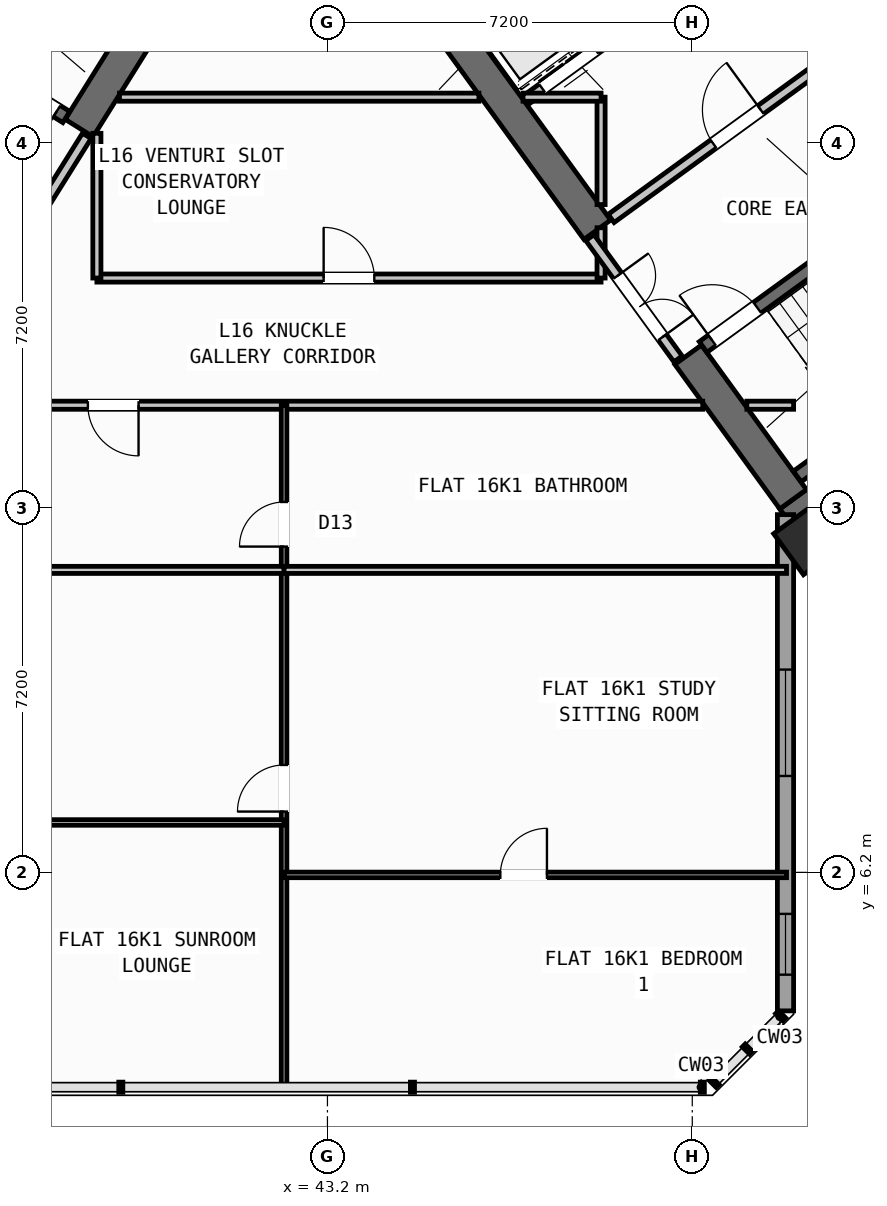
"""IFC4 building model, lengths in metres.
Left out: names, types, materials, properties, quantities, classifications, styles, units other than length and angle.
Written with IfcOpenShell. Run it as: python <this file> out.ifc"""

import sys

from ifc_helpers import new_model, si_unit, direction, frame, frame_2d, origin, origin_2d, place, context, subcontext, project, spatial, rectangle, hollow_rectangle, extrude, source, transform, mapped, element, fill, save


model = new_model("IFC4")
c1 = context("Model", 3, precision=1e-05, world=origin(), true_north=direction((0.0, 1.0)))
c2 = subcontext(c1, "Body", "Model", "MODEL_VIEW")
j1 = project(units=[si_unit("LENGTHUNIT", "METRE"), si_unit("PLANEANGLEUNIT", "RADIAN")], contexts=[c1])
p1 = place(None, origin())
s1 = spatial("IfcSite", under=j1, at=p1, CompositionType="ELEMENT")
p2 = place(p1, origin())
s2 = spatial("IfcBuilding", under=s1, at=p2, CompositionType="ELEMENT")
p3 = place(p2, frame((0.0, 0.0, 63.6)))
s3 = spatial("IfcBuildingStorey", under=s2, at=p3, CompositionType="ELEMENT", Elevation=63.6)
p4 = place(p3, frame((40.168, 23.88, 0.0), z_axis=(0.0, 0.0, 1.0), x_axis=(-0.529893103397, -0.8480644427, 0.0)))
e1 = element("IfcWall", 1, at=p4, inside=s3, PredefinedType="SHEAR", context=c2, shape_type="SweptSolid", body=[
    extrude(rectangle(XDim=3.525, YDim=0.65, at=frame_2d((1.763, 0.0))), origin(), (0.0, 0.0, 1.0), 3.35),
])
p5 = place(p3, frame((52.318, 13.11, 0.0), z_axis=(0.0, 0.0, 1.0), x_axis=(0.809019445368, 0.587781878776, 0.0)))
e2 = element("IfcWall", 2, at=p5, inside=s3, PredefinedType="SHEAR", context=c2, shape_type="SweptSolid", body=[
    extrude(rectangle(XDim=12.44, YDim=0.65, at=frame_2d((6.22, 0.0))), origin(), (0.0, 0.0, 1.0), 3.35),
])
p6 = place(p3, frame((52.39, 13.564, 0.0), z_axis=(0.0, 0.0, 1.0), x_axis=(-0.58779688989, 0.809008539037, 0.0)))
e3 = element("IfcWall", 3, at=p6, inside=s3, PredefinedType="SHEAR", context=c2, shape_type="SweptSolid", body=[
    extrude(rectangle(XDim=3.525, YDim=0.65, at=frame_2d((1.763, 0.0))), origin(), (0.0, 0.0, 1.0), 3.35),
])
p7 = place(p3, frame((48.526, 18.884, 0.0), z_axis=(0.0, 0.0, 1.0), x_axis=(-0.58777996584, 0.809020835181, 0.0)))
e4 = element("IfcWall", 4, at=p7, inside=s3, PredefinedType="SHEAR", context=c2, shape_type="SweptSolid", body=[
    extrude(rectangle(XDim=6.375, YDim=0.65, at=frame_2d((3.188, 0.0))), origin(), (0.0, 0.0, 1.0), 3.35),
])
m1 = source(origin(), c2, "Body", "SweptSolid", [
    extrude(hollow_rectangle(XDim=1.0, YDim=1.0, WallThickness=0.04, at=origin_2d()), origin(), (0.0, 0.0, 1.0), 3.6),
])
p8 = place(p3, frame((52.705, 12.773, 0.0), z_axis=(0.0, 0.0, 1.0), x_axis=(0.809016994375, 0.587785252292, 0.0)))
e5 = element("IfcColumn", 5, at=p8, inside=s3, PredefinedType="COLUMN", context=c2, shape_type="MappedRepresentation", body=[
    mapped(m1, transform((0.0, 0.0, 0.0), scale=1.0)),
])
p9 = place(p3, frame((56.581, 7.439, 0.0), z_axis=(0.0, 0.0, 1.0), x_axis=(-0.587785875463, 0.809016541614, 0.0)))
e6 = element("IfcWall", 6, at=p9, inside=s3, PredefinedType="STANDARD", context=c2, shape_type="SweptSolid", body=[
    extrude(rectangle(XDim=6.774, YDim=0.32, at=frame_2d((3.387, 0.0))), origin(), (0.0, 0.0, 1.0), 2.725),
])
p10 = place(p9, frame((1.556, 0.0, 0.8)))
e7 = element("IfcOpeningElement", 7, at=p10, cuts=e6, PredefinedType="OPENING", context=c2, shape_type="SweptSolid", body=[
    extrude(rectangle(XDim=2.1, YDim=1.55, at=frame_2d((1.05, 0.775))), frame((0.0, 0.17, 0.0), z_axis=(0.0, -1.0, 0.0), x_axis=(1.0, 0.0, 0.0)), (0.0, 0.0, 1.0), 0.34),
])
p11 = place(p3, frame((52.24, 13.261, 0.0), z_axis=(0.0, 0.0, 1.0), x_axis=(0.0, -1.0, 0.0)))
e8 = element("IfcWall", 8, at=p11, inside=s3, PredefinedType="STANDARD", context=c2, shape_type="SweptSolid", body=[
    extrude(rectangle(XDim=9.795, YDim=0.32, at=frame_2d((4.897, 0.0))), origin(), (0.0, 0.0, 1.0), 3.35),
])
p12 = place(p11, frame((3.058, 0.0, 0.8)))
e9 = element("IfcOpeningElement", 9, at=p12, cuts=e8, PredefinedType="OPENING", context=c2, shape_type="SweptSolid", body=[
    extrude(rectangle(XDim=2.1, YDim=1.55, at=frame_2d((1.05, 0.775))), frame((0.0, 0.17, 0.0), z_axis=(0.0, -1.0, 0.0), x_axis=(1.0, 0.0, 0.0)), (0.0, 0.0, 1.0), 0.34),
])
p13 = place(p11, frame((7.88, 0.0, 0.95)))
e10 = element("IfcOpeningElement", 10, at=p13, cuts=e8, PredefinedType="OPENING", context=c2, shape_type="SweptSolid", body=[
    extrude(rectangle(XDim=1.2, YDim=1.4, at=frame_2d((0.6, 0.7))), frame((0.0, 0.17, 0.0), z_axis=(0.0, -1.0, 0.0), x_axis=(1.0, 0.0, 0.0)), (0.0, 0.0, 1.0), 0.34),
])
p14 = place(p3, frame((38.046, 21.108, 0.0), z_axis=(0.0, 0.0, 1.0), x_axis=(-0.848054434086, 0.529909121291, 0.0)))
e11 = element("IfcWall", 11, at=p14, inside=s3, PredefinedType="SHEAR", context=c2, shape_type="SweptSolid", body=[
    extrude(rectangle(XDim=7.33, YDim=0.26, at=frame_2d((3.665, 0.0))), origin(), (0.0, 0.0, 1.0), 3.35),
])
p15 = place(p14, frame((0.22, 0.0, 0.0)))
e12 = element("IfcOpeningElement", 12, at=p15, cuts=e11, PredefinedType="OPENING", context=c2, shape_type="SweptSolid", body=[
    extrude(rectangle(XDim=1.1, YDim=2.1, at=frame_2d((0.55, 1.05))), frame((0.0, 0.14, 0.0), z_axis=(0.0, -1.0, 0.0), x_axis=(1.0, 0.0, 0.0)), (0.0, 0.0, 1.0), 0.28),
])
p16 = place(p3, frame((52.472, 14.013, 0.0), z_axis=(0.0, 0.0, 1.0), x_axis=(0.809028366311, 0.587769599847, 0.0)))
e13 = element("IfcWall", 13, at=p16, inside=s3, PredefinedType="SHEAR", context=c2, shape_type="SweptSolid", body=[
    extrude(rectangle(XDim=7.33, YDim=0.26, at=frame_2d((3.665, 0.0))), origin(), (0.0, 0.0, 1.0), 3.35),
])
p17 = place(p3, frame((50.615, 16.57, 0.0), z_axis=(0.0, 0.0, 1.0), x_axis=(0.809028366311, 0.587769599847, 0.0)))
e14 = element("IfcWall", 14, at=p17, inside=s3, PredefinedType="SHEAR", context=c2, shape_type="SweptSolid", body=[
    extrude(rectangle(XDim=7.33, YDim=0.26, at=frame_2d((3.665, 0.0))), origin(), (0.0, 0.0, 1.0), 3.35),
])
p18 = place(p17, frame((0.22, 0.0, 0.0)))
e15 = element("IfcOpeningElement", 15, at=p18, cuts=e14, PredefinedType="OPENING", context=c2, shape_type="SweptSolid", body=[
    extrude(rectangle(XDim=1.1, YDim=2.1, at=frame_2d((0.55, 1.05))), frame((0.0, 0.14, 0.0), z_axis=(0.0, -1.0, 0.0), x_axis=(1.0, 0.0, 0.0)), (0.0, 0.0, 1.0), 0.28),
])
p19 = place(p3, frame((47.106, 21.437, 0.0), z_axis=(0.0, 0.0, 1.0), x_axis=(0.809012514015, 0.58779141893, 0.0)))
e16 = element("IfcWall", 16, at=p19, inside=s3, PredefinedType="STANDARD", context=c2, shape_type="SweptSolid", body=[
    extrude(rectangle(XDim=3.398, YDim=0.2, at=frame_2d((1.699, 0.0))), origin(), (0.0, 0.0, 1.0), 3.34),
])
p20 = place(p19, frame((0.408, 0.0, 0.0)))
e17 = element("IfcOpeningElement", 17, at=p20, cuts=e16, PredefinedType="OPENING", context=c2, shape_type="SweptSolid", body=[
    extrude(rectangle(XDim=1.3, YDim=2.2, at=frame_2d((0.65, 1.1))), frame((0.0, 0.11, 0.0), z_axis=(0.0, -1.0, 0.0), x_axis=(1.0, 0.0, 0.0)), (0.0, 0.0, 1.0), 0.22),
])
p21 = place(p3, frame((48.799, 19.107, 0.0), z_axis=(0.0, 0.0, 1.0), x_axis=(0.809012959416, 0.587790805897, 0.0)))
e18 = element("IfcWall", 18, at=p21, inside=s3, PredefinedType="STANDARD", context=c2, shape_type="SweptSolid", body=[
    extrude(rectangle(XDim=5.718, YDim=0.2, at=frame_2d((2.859, 0.0))), origin(), (0.0, 0.0, 1.0), 3.34),
])
p22 = place(p21, frame((2.498, 0.0, 0.0)))
e19 = element("IfcOpeningElement", 19, at=p22, cuts=e18, PredefinedType="OPENING", context=c2, shape_type="SweptSolid", body=[
    extrude(rectangle(XDim=1.15, YDim=2.1, at=frame_2d((0.575, 1.05))), frame((0.0, 0.11, 0.0), z_axis=(0.0, -1.0, 0.0), x_axis=(1.0, 0.0, 0.0)), (0.0, 0.0, 1.0), 0.22),
])
p23 = place(p3, frame((38.451, 20.737, 0.0), z_axis=(0.0, 0.0, 1.0), x_axis=(-0.529924799939, -0.848044637038, 0.0)))
e20 = element("IfcWall", 20, at=p23, inside=s3, PredefinedType="STANDARD", context=c2, shape_type="SweptSolid", body=[
    extrude(rectangle(XDim=2.96, YDim=0.2, at=frame_2d((1.48, 0.0))), origin(), (0.0, 0.0, 1.0), 3.34),
])
p24 = place(p23, frame((1.46, 0.0, 0.0)))
e21 = element("IfcOpeningElement", 21, at=p24, cuts=e20, PredefinedType="OPENING", context=c2, shape_type="SweptSolid", body=[
    extrude(rectangle(XDim=0.86, YDim=2.05, at=frame_2d((0.43, 1.025))), frame((0.0, 0.11, 0.0), z_axis=(0.0, -1.0, 0.0), x_axis=(1.0, 0.0, 0.0)), (0.0, 0.0, 1.0), 0.22),
])
p25 = place(p3, frame((35.296, 15.42, 0.0), z_axis=(0.0, 0.0, 1.0), x_axis=(1.0, 0.0, 0.0)))
e22 = element("IfcWall", 22, at=p25, inside=s3, PredefinedType="PARTITIONING", context=c2, shape_type="SweptSolid", body=[
    extrude(rectangle(XDim=15.311, YDim=0.16, at=frame_2d((7.655, 0.0))), origin(), (0.0, 0.0, 1.0), 3.34),
])
p26 = place(p25, frame((3.176, 0.0, 0.0)))
e23 = element("IfcOpeningElement", 23, at=p26, cuts=e22, PredefinedType="OPENING", context=c2, shape_type="SweptSolid", body=[
    extrude(rectangle(XDim=1.0, YDim=2.1, at=frame_2d((0.5, 1.05))), frame((0.0, 0.09, 0.0), z_axis=(0.0, -1.0, 0.0), x_axis=(1.0, 0.0, 0.0)), (0.0, 0.0, 1.0), 0.18),
])
p27 = place(p3, frame((51.477, 15.42, 0.0), z_axis=(0.0, 0.0, 1.0), x_axis=(1.0, 0.0, 0.0)))
e24 = element("IfcWall", 24, at=p27, inside=s3, PredefinedType="PARTITIONING", context=c2, shape_type="SweptSolid", body=[
    extrude(rectangle(XDim=0.923, YDim=0.16, at=frame_2d((0.461, 0.0))), origin(), (0.0, 0.0, 1.0), 3.34),
])
p28 = place(p3, frame((38.65, 17.93, 0.0), z_axis=(0.0, 0.0, 1.0), x_axis=(1.0, 0.0, 0.0)))
e25 = element("IfcWall", 25, at=p28, inside=s3, PredefinedType="PARTITIONING", context=c2, shape_type="SweptSolid", body=[
    extrude(rectangle(XDim=9.95, YDim=0.16, at=frame_2d((4.975, 0.0))), origin(), (0.0, 0.0, 1.0), 3.34),
])
p29 = place(p28, frame((4.475, 0.0, 0.0)))
e26 = element("IfcOpeningElement", 26, at=p29, cuts=e25, PredefinedType="OPENING", context=c2, shape_type="SweptSolid", body=[
    extrude(rectangle(XDim=1.0, YDim=2.1, at=frame_2d((0.5, 1.05))), frame((0.0, 0.09, 0.0), z_axis=(0.0, -1.0, 0.0), x_axis=(1.0, 0.0, 0.0)), (0.0, 0.0, 1.0), 0.18),
])
p30 = place(p3, frame((38.65, 17.93, 0.0), z_axis=(0.0, 0.0, 1.0), x_axis=(0.0, 1.0, 0.0)))
e27 = element("IfcWall", 27, at=p30, inside=s3, PredefinedType="PARTITIONING", context=c2, shape_type="SweptSolid", body=[
    extrude(rectangle(XDim=2.857, YDim=0.16, at=frame_2d((1.428, 0.0))), origin(), (0.0, 0.0, 1.0), 3.34),
])
p31 = place(p3, frame((48.6, 17.93, 0.0), z_axis=(0.0, 0.0, 1.0), x_axis=(0.0, 1.0, 0.0)))
e28 = element("IfcWall", 28, at=p31, inside=s3, PredefinedType="PARTITIONING", context=c2, shape_type="SweptSolid", body=[
    extrude(rectangle(XDim=0.993, YDim=0.16, at=frame_2d((0.496, 0.0))), origin(), (0.0, 0.0, 1.0), 3.34),
])
p32 = place(p3, frame((48.6, 19.38, 0.0), z_axis=(0.0, 0.0, 1.0), x_axis=(0.0, 1.0, 0.0)))
e29 = element("IfcWall", 29, at=p32, inside=s3, PredefinedType="PARTITIONING", context=c2, shape_type="SweptSolid", body=[
    extrude(rectangle(XDim=2.12, YDim=0.16, at=frame_2d((1.06, 0.0))), origin(), (0.0, 0.0, 1.0), 3.34),
])
p33 = place(p3, frame((39.095, 21.5, 0.0), z_axis=(0.0, 0.0, 1.0), x_axis=(1.0, 0.0, 0.0)))
e30 = element("IfcWall", 30, at=p33, inside=s3, PredefinedType="PARTITIONING", context=c2, shape_type="SweptSolid", body=[
    extrude(rectangle(XDim=7.094, YDim=0.16, at=frame_2d((3.547, 0.0))), origin(), (0.0, 0.0, 1.0), 3.34),
])
p34 = place(p3, frame((47.06, 21.5, 0.0), z_axis=(0.0, 0.0, 1.0), x_axis=(1.0, 0.0, 0.0)))
e31 = element("IfcWall", 31, at=p34, inside=s3, PredefinedType="PARTITIONING", context=c2, shape_type="SweptSolid", body=[
    extrude(rectangle(XDim=1.54, YDim=0.16, at=frame_2d((0.77, 0.0))), origin(), (0.0, 0.0, 1.0), 3.34),
])
p35 = place(p3, frame((50.119, 16.333, 0.0), z_axis=(0.0, 0.0, 1.0), x_axis=(-0.587749856981, 0.809042709391, 0.0)))
e32 = element("IfcWall", 32, at=p35, inside=s3, PredefinedType="STANDARD", context=c2, shape_type="SweptSolid", body=[
    extrude(rectangle(XDim=2.96, YDim=0.2, at=frame_2d((1.48, 0.0))), origin(), (0.0, 0.0, 1.0), 3.34),
])
p36 = place(p35, frame((0.53, 0.0, 0.0)))
e33 = element("IfcOpeningElement", 33, at=p36, cuts=e32, PredefinedType="OPENING", context=c2, shape_type="SweptSolid", body=[
    extrude(rectangle(XDim=1.5, YDim=2.15, at=frame_2d((0.75, 1.075))), frame((0.0, 0.11, 0.0), z_axis=(0.0, -1.0, 0.0), x_axis=(1.0, 0.0, 0.0)), (0.0, 0.0, 1.0), 0.22),
])
p37 = place(p3, frame((42.344, 1.96, 0.0), z_axis=(0.0, 0.0, 1.0), x_axis=(0.0, 1.0, 0.0)))
e34 = element("IfcWall", 34, at=p37, inside=s3, PredefinedType="PARTITIONING", context=c2, shape_type="SweptSolid", body=[
    extrude(rectangle(XDim=13.46, YDim=0.11, at=frame_2d((6.73, 0.0))), origin(), (0.0, 0.0, 1.0), 3.34),
])
p38 = place(p37, frame((5.44, 0.0, 0.0)))
e35 = element("IfcOpeningElement", 35, at=p38, cuts=e34, PredefinedType="OPENING", context=c2, shape_type="SweptSolid", body=[
    extrude(rectangle(XDim=0.92, YDim=2.08, at=frame_2d((0.46, 1.04))), frame((0.0, 0.065, 0.0), z_axis=(0.0, -1.0, 0.0), x_axis=(1.0, 0.0, 0.0)), (0.0, 0.0, 1.0), 0.13),
])
p39 = place(p37, frame((10.67, 0.0, 0.0)))
e36 = element("IfcOpeningElement", 36, at=p39, cuts=e34, PredefinedType="OPENING", context=c2, shape_type="SweptSolid", body=[
    extrude(rectangle(XDim=0.88, YDim=2.08, at=frame_2d((0.44, 1.04))), frame((0.0, 0.065, 0.0), z_axis=(0.0, -1.0, 0.0), x_axis=(1.0, 0.0, 0.0)), (0.0, 0.0, 1.0), 0.13),
])
p40 = place(p3, frame((33.702, 12.17, 0.0), z_axis=(0.0, 0.0, 1.0), x_axis=(1.0, 0.0, 0.0)))
e37 = element("IfcWall", 37, at=p40, inside=s3, PredefinedType="PLUMBINGWALL", context=c2, shape_type="SweptSolid", body=[
    extrude(rectangle(XDim=8.642, YDim=0.14, at=frame_2d((4.321, 0.0))), origin(), (0.0, 0.0, 1.0), 2.525),
])
p41 = place(p40, frame((3.06, 0.0, 0.0)))
e38 = element("IfcOpeningElement", 38, at=p41, cuts=e37, PredefinedType="OPENING", context=c2, shape_type="SweptSolid", body=[
    extrude(rectangle(XDim=0.92, YDim=2.08, at=frame_2d((0.46, 1.04))), frame((0.0, 0.08, 0.0), z_axis=(0.0, -1.0, 0.0), x_axis=(1.0, 0.0, 0.0)), (0.0, 0.0, 1.0), 0.16),
])
p42 = place(p3, frame((42.344, 12.17, 0.0), z_axis=(0.0, 0.0, 1.0), x_axis=(1.0, 0.0, 0.0)))
e39 = element("IfcWall", 39, at=p42, inside=s3, PredefinedType="PLUMBINGWALL", context=c2, shape_type="SweptSolid", body=[
    extrude(rectangle(XDim=9.916, YDim=0.14, at=frame_2d((4.958, 0.0))), origin(), (0.0, 0.0, 1.0), 2.525),
])
p43 = place(p3, frame((31.74, 7.185, 0.0), z_axis=(0.0, 0.0, 1.0), x_axis=(1.0, 0.0, 0.0)))
e40 = element("IfcWall", 40, at=p43, inside=s3, PredefinedType="PARTITIONING", context=c2, shape_type="SweptSolid", body=[
    extrude(rectangle(XDim=10.604, YDim=0.11, at=frame_2d((5.302, 0.0))), origin(), (0.0, 0.0, 1.0), 3.34),
])
p44 = place(p43, frame((5.022, 0.0, 0.0)))
e41 = element("IfcOpeningElement", 41, at=p44, cuts=e40, PredefinedType="OPENING", context=c2, shape_type="SweptSolid", body=[
    extrude(rectangle(XDim=0.92, YDim=2.08, at=frame_2d((0.46, 1.04))), frame((0.0, 0.065, 0.0), z_axis=(0.0, -1.0, 0.0), x_axis=(1.0, 0.0, 0.0)), (0.0, 0.0, 1.0), 0.13),
])
p45 = place(p3, frame((42.344, 6.15, 0.0), z_axis=(0.0, 0.0, 1.0), x_axis=(1.0, 0.0, 0.0)))
e42 = element("IfcWall", 42, at=p45, inside=s3, PredefinedType="PARTITIONING", context=c2, shape_type="SweptSolid", body=[
    extrude(rectangle(XDim=9.916, YDim=0.11, at=frame_2d((4.958, 0.0))), origin(), (0.0, 0.0, 1.0), 3.34),
])
p46 = place(p45, frame((4.268, 0.0, 0.0)))
e43 = element("IfcOpeningElement", 43, at=p46, cuts=e42, PredefinedType="OPENING", context=c2, shape_type="SweptSolid", body=[
    extrude(rectangle(XDim=0.92, YDim=2.08, at=frame_2d((0.46, 1.04))), frame((0.0, 0.065, 0.0), z_axis=(0.0, -1.0, 0.0), x_axis=(1.0, 0.0, 0.0)), (0.0, 0.0, 1.0), 0.13),
])
m2 = source(origin(), c2, "Body", "SweptSolid", [
    extrude(rectangle(XDim=2.1, YDim=1.55, at=frame_2d((1.05, 0.775))), frame((0.0, 0.03, 0.0), z_axis=(0.0, -1.0, 0.0), x_axis=(1.0, 0.0, 0.0)), (0.0, 0.0, 1.0), 0.06),
])
p47 = place(p12, origin())
e44 = element("IfcWindow", 44, at=p47, inside=s3, PartitioningType="SINGLE_PANEL", PredefinedType="WINDOW", context=c2, shape_type="MappedRepresentation", body=[
    mapped(m2, transform((0.0, 0.0, 0.0), scale=1.0)),
])
fill(e9, e44)
m3 = source(origin(), c2, "Body", "SweptSolid", [
    extrude(rectangle(XDim=1.2, YDim=1.4, at=frame_2d((0.6, 0.7))), frame((0.0, 0.03, 0.0), z_axis=(0.0, -1.0, 0.0), x_axis=(1.0, 0.0, 0.0)), (0.0, 0.0, 1.0), 0.06),
])
p48 = place(p13, origin())
e45 = element("IfcWindow", 45, at=p48, inside=s3, PartitioningType="SINGLE_PANEL", PredefinedType="WINDOW", context=c2, shape_type="MappedRepresentation", body=[
    mapped(m3, transform((0.0, 0.0, 0.0), scale=1.0)),
])
fill(e10, e45)
m4 = source(origin(), c2, "Body", "SweptSolid", [
    extrude(rectangle(XDim=1.1, YDim=2.1, at=frame_2d((0.55, 1.05))), frame((0.0, 0.025, 0.0), z_axis=(0.0, -1.0, 0.0), x_axis=(1.0, 0.0, 0.0)), (0.0, 0.0, 1.0), 0.05),
])
p49 = place(p15, origin())
e46 = element("IfcDoor", 46, at=p49, inside=s3, OperationType="SINGLE_SWING_LEFT", PredefinedType="DOOR", context=c2, shape_type="MappedRepresentation", body=[
    mapped(m4, transform((0.0, 0.0, 0.0), scale=1.0)),
])
fill(e12, e46)
p50 = place(p18, origin())
e47 = element("IfcDoor", 47, at=p50, inside=s3, OperationType="SINGLE_SWING_LEFT", PredefinedType="DOOR", context=c2, shape_type="MappedRepresentation", body=[
    mapped(m4, transform((0.0, 0.0, 0.0), scale=1.0)),
])
fill(e15, e47)
m5 = source(origin(), c2, "Body", "SweptSolid", [
    extrude(rectangle(XDim=1.15, YDim=2.1, at=frame_2d((0.575, 1.05))), frame((0.0, 0.025, 0.0), z_axis=(0.0, -1.0, 0.0), x_axis=(1.0, 0.0, 0.0)), (0.0, 0.0, 1.0), 0.05),
])
p51 = place(p22, origin())
e48 = element("IfcDoor", 48, at=p51, inside=s3, OperationType="SINGLE_SWING_RIGHT", PredefinedType="DOOR", context=c2, shape_type="MappedRepresentation", body=[
    mapped(m5, transform((0.0, 0.0, 0.0), scale=1.0)),
])
fill(e19, e48)
m6 = source(origin(), c2, "Body", "SweptSolid", [
    extrude(rectangle(XDim=1.3, YDim=2.2, at=frame_2d((0.65, 1.1))), frame((0.0, 0.025, 0.0), z_axis=(0.0, -1.0, 0.0), x_axis=(1.0, 0.0, 0.0)), (0.0, 0.0, 1.0), 0.05),
])
p52 = place(p20, origin())
e49 = element("IfcDoor", 49, at=p52, inside=s3, OperationType="DOUBLE_DOOR_SLIDING", PredefinedType="DOOR", context=c2, shape_type="MappedRepresentation", body=[
    mapped(m6, transform((0.0, 0.0, 0.0), scale=1.0)),
])
fill(e17, e49)
m7 = source(origin(), c2, "Body", "SweptSolid", [
    extrude(rectangle(XDim=1.0, YDim=2.1, at=frame_2d((0.5, 1.05))), frame((0.0, 0.025, 0.0), z_axis=(0.0, -1.0, 0.0), x_axis=(1.0, 0.0, 0.0)), (0.0, 0.0, 1.0), 0.05),
])
p53 = place(p29, origin())
e50 = element("IfcDoor", 50, at=p53, inside=s3, OperationType="SINGLE_SWING_LEFT", PredefinedType="DOOR", context=c2, shape_type="MappedRepresentation", body=[
    mapped(m7, transform((0.0, 0.0, 0.0), scale=1.0)),
])
fill(e26, e50)
m8 = source(origin(), c2, "Body", "SweptSolid", [
    extrude(rectangle(XDim=1.5, YDim=2.15, at=frame_2d((0.75, 1.075))), frame((0.0, 0.025, 0.0), z_axis=(0.0, -1.0, 0.0), x_axis=(1.0, 0.0, 0.0)), (0.0, 0.0, 1.0), 0.05),
])
p54 = place(p36, frame((1.5, 0.0, 0.0), z_axis=(0.0, 0.0, 1.0), x_axis=(-1.0, 0.0, 0.0)))
e51 = element("IfcDoor", 51, at=p54, inside=s3, OperationType="DOUBLE_DOOR_SINGLE_SWING", PredefinedType="DOOR", context=c2, shape_type="MappedRepresentation", body=[
    mapped(m8, transform((0.0, 0.0, 0.0), scale=1.0)),
])
fill(e33, e51)
m9 = source(origin(), c2, "Body", "SweptSolid", [
    extrude(rectangle(XDim=0.92, YDim=2.08, at=frame_2d((0.46, 1.04))), frame((0.0, 0.025, 0.0), z_axis=(0.0, -1.0, 0.0), x_axis=(1.0, 0.0, 0.0)), (0.0, 0.0, 1.0), 0.05),
])
p55 = place(p38, origin())
e52 = element("IfcDoor", 52, at=p55, inside=s3, OperationType="SINGLE_SWING_LEFT", PredefinedType="DOOR", context=c2, shape_type="MappedRepresentation", body=[
    mapped(m9, transform((0.0, 0.0, 0.0), scale=1.0)),
])
fill(e35, e52)
p56 = place(p46, origin())
e53 = element("IfcDoor", 53, at=p56, inside=s3, OperationType="SINGLE_SWING_RIGHT", PredefinedType="DOOR", context=c2, shape_type="MappedRepresentation", body=[
    mapped(m9, transform((0.0, 0.0, 0.0), scale=1.0)),
])
fill(e43, e53)
p57 = place(p26, frame((1.0, 0.0, 0.0), z_axis=(0.0, 0.0, 1.0), x_axis=(-1.0, 0.0, 0.0)))
e54 = element("IfcDoor", 54, at=p57, inside=s3, OperationType="SINGLE_SWING_LEFT", PredefinedType="DOOR", context=c2, shape_type="MappedRepresentation", body=[
    mapped(m7, transform((0.0, 0.0, 0.0), scale=1.0)),
])
fill(e23, e54)
m10 = source(origin(), c2, "Body", "SweptSolid", [
    extrude(rectangle(XDim=0.88, YDim=2.08, at=frame_2d((0.44, 1.04))), frame((0.0, 0.025, 0.0), z_axis=(0.0, -1.0, 0.0), x_axis=(1.0, 0.0, 0.0)), (0.0, 0.0, 1.0), 0.05),
])
p58 = place(p39, origin())
e55 = element("IfcDoor", 55, at=p58, inside=s3, OperationType="SINGLE_SWING_LEFT", PredefinedType="DOOR", context=c2, shape_type="MappedRepresentation", body=[
    mapped(m10, transform((0.0, 0.0, 0.0), scale=1.0)),
])
fill(e36, e55)
save(model, sys.argv[1])
